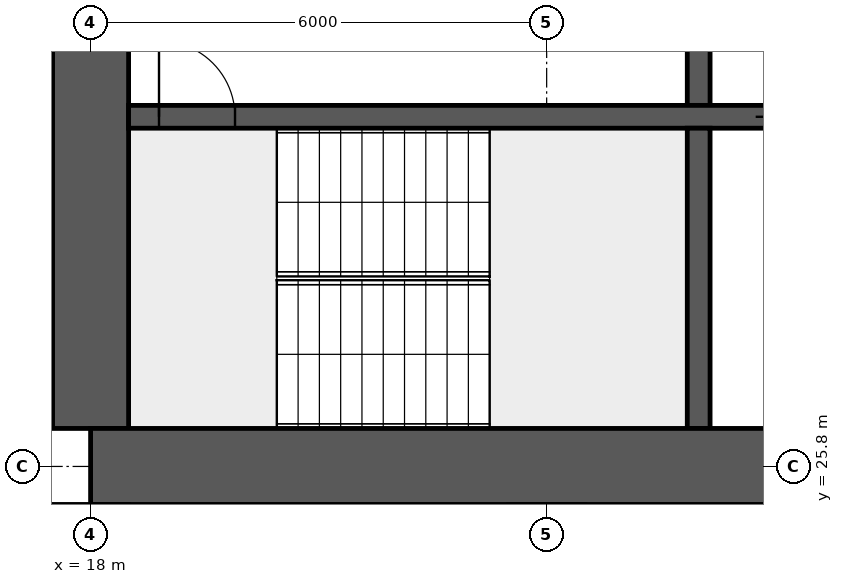
"""IFC4 building model, lengths in metres.
Left out: names, types, materials, properties, quantities, classifications, styles, units other than length and angle.
Written with IfcOpenShell. Run it as: python <this file> out.ifc"""

import sys

from ifc_helpers import new_model, si_unit, direction, frame, frame_2d, origin, place, context, subcontext, project, spatial, rectangle, extrude, element, fill, save


model = new_model("IFC4")
c1 = context("Model", 3, precision=1e-05, world=origin(), true_north=direction((0.0, 1.0)))
c2 = subcontext(c1, "Body", "Model", "MODEL_VIEW")
j1 = project(units=[si_unit("LENGTHUNIT", "METRE"), si_unit("PLANEANGLEUNIT", "RADIAN")], contexts=[c1])
p1 = place(None, origin())
s1 = spatial("IfcSite", under=j1, at=p1, CompositionType="ELEMENT")
p2 = place(p1, origin())
s2 = spatial("IfcBuilding", under=s1, at=p2, CompositionType="ELEMENT")
p3 = place(p2, frame((0.0, 0.0, 27.7)))
s3 = spatial("IfcBuildingStorey", under=s2, at=p3, CompositionType="ELEMENT", Elevation=27.7)
p4 = place(p3, frame((18.0, 25.8, 0.0), z_axis=(0.0, 0.0, 1.0), x_axis=(1.0, 0.0, 0.0)))
e1 = element("IfcWall", 1, at=p4, inside=s3, PredefinedType="SHEAR", context=c2, shape_type="SweptSolid", body=[
    extrude(rectangle(XDim=48.0, YDim=1.0, at=frame_2d((24.0, 0.0))), origin(), (0.0, 0.0, 1.0), 3.75),
])
p5 = place(p3, frame((18.0, 26.3, 0.0), z_axis=(0.0, 0.0, 1.0), x_axis=(0.0, 1.0, 0.0)))
e2 = element("IfcWall", 2, at=p5, inside=s3, PredefinedType="SHEAR", context=c2, shape_type="SweptSolid", body=[
    extrude(rectangle(XDim=11.4, YDim=1.0, at=frame_2d((5.7, 0.0))), origin(), (0.0, 0.0, 1.0), 3.75),
])
p6 = place(p5, frame((5.0, 0.0, 0.0)))
e3 = element("IfcOpeningElement", 3, at=p6, cuts=e2, PredefinedType="OPENING", context=c2, shape_type="SweptSolid", body=[
    extrude(rectangle(XDim=1.2, YDim=2.1, at=frame_2d((0.6, 1.05))), frame((0.0, 0.51, 0.0), z_axis=(0.0, -1.0, 0.0), x_axis=(1.0, 0.0, 0.0)), (0.0, 0.0, 1.0), 1.02),
])
p7 = place(p3, frame((18.5, 30.4, 0.0), z_axis=(0.0, 0.0, 1.0), x_axis=(1.0, 0.0, 0.0)))
e4 = element("IfcWall", 4, at=p7, inside=s3, PredefinedType="SHEAR", context=c2, shape_type="SweptSolid", body=[
    extrude(rectangle(XDim=47.0, YDim=0.3, at=frame_2d((23.5, 0.0))), origin(), (0.0, 0.0, 1.0), 3.75),
])
p8 = place(p7, frame((0.4, 0.0, 0.0)))
e5 = element("IfcOpeningElement", 5, at=p8, cuts=e4, PredefinedType="OPENING", context=c2, shape_type="SweptSolid", body=[
    extrude(rectangle(XDim=1.0, YDim=2.1, at=frame_2d((0.5, 1.05))), frame((0.0, 0.16, 0.0), z_axis=(0.0, -1.0, 0.0), x_axis=(1.0, 0.0, 0.0)), (0.0, 0.0, 1.0), 0.32),
])
p9 = place(p7, frame((45.6, 0.0, 0.0)))
e6 = element("IfcOpeningElement", 6, at=p9, cuts=e4, PredefinedType="OPENING", context=c2, shape_type="SweptSolid", body=[
    extrude(rectangle(XDim=1.0, YDim=2.1, at=frame_2d((0.5, 1.05))), frame((0.0, 0.16, 0.0), z_axis=(0.0, -1.0, 0.0), x_axis=(1.0, 0.0, 0.0)), (0.0, 0.0, 1.0), 0.32),
])
p10 = place(p7, frame((8.25, 0.0, 0.0)))
e7 = element("IfcOpeningElement", 7, at=p10, cuts=e4, PredefinedType="OPENING", context=c2, shape_type="SweptSolid", body=[
    extrude(rectangle(XDim=1.1, YDim=2.1, at=frame_2d((0.55, 1.05))), frame((0.0, 0.16, 0.0), z_axis=(0.0, -1.0, 0.0), x_axis=(1.0, 0.0, 0.0)), (0.0, 0.0, 1.0), 0.32),
])
p11 = place(p7, frame((10.85, 0.0, 0.0)))
e8 = element("IfcOpeningElement", 8, at=p11, cuts=e4, PredefinedType="OPENING", context=c2, shape_type="SweptSolid", body=[
    extrude(rectangle(XDim=1.1, YDim=2.1, at=frame_2d((0.55, 1.05))), frame((0.0, 0.16, 0.0), z_axis=(0.0, -1.0, 0.0), x_axis=(1.0, 0.0, 0.0)), (0.0, 0.0, 1.0), 0.32),
])
p12 = place(p7, frame((13.45, 0.0, 0.0)))
e9 = element("IfcOpeningElement", 9, at=p12, cuts=e4, PredefinedType="OPENING", context=c2, shape_type="SweptSolid", body=[
    extrude(rectangle(XDim=1.1, YDim=2.1, at=frame_2d((0.55, 1.05))), frame((0.0, 0.16, 0.0), z_axis=(0.0, -1.0, 0.0), x_axis=(1.0, 0.0, 0.0)), (0.0, 0.0, 1.0), 0.32),
])
p13 = place(p7, frame((16.05, 0.0, 0.0)))
e10 = element("IfcOpeningElement", 10, at=p13, cuts=e4, PredefinedType="OPENING", context=c2, shape_type="SweptSolid", body=[
    extrude(rectangle(XDim=1.1, YDim=2.1, at=frame_2d((0.55, 1.05))), frame((0.0, 0.16, 0.0), z_axis=(0.0, -1.0, 0.0), x_axis=(1.0, 0.0, 0.0)), (0.0, 0.0, 1.0), 0.32),
])
p14 = place(p7, frame((30.117, 0.0, 0.0)))
e11 = element("IfcOpeningElement", 11, at=p14, cuts=e4, PredefinedType="OPENING", context=c2, shape_type="SweptSolid", body=[
    extrude(rectangle(XDim=1.1, YDim=2.1, at=frame_2d((0.55, 1.05))), frame((0.0, 0.16, 0.0), z_axis=(0.0, -1.0, 0.0), x_axis=(1.0, 0.0, 0.0)), (0.0, 0.0, 1.0), 0.32),
])
p15 = place(p7, frame((33.65, 0.0, 0.0)))
e12 = element("IfcOpeningElement", 12, at=p15, cuts=e4, PredefinedType="OPENING", context=c2, shape_type="SweptSolid", body=[
    extrude(rectangle(XDim=1.1, YDim=2.1, at=frame_2d((0.55, 1.05))), frame((0.0, 0.16, 0.0), z_axis=(0.0, -1.0, 0.0), x_axis=(1.0, 0.0, 0.0)), (0.0, 0.0, 1.0), 0.32),
])
p16 = place(p7, frame((37.183, 0.0, 0.0)))
e13 = element("IfcOpeningElement", 13, at=p16, cuts=e4, PredefinedType="OPENING", context=c2, shape_type="SweptSolid", body=[
    extrude(rectangle(XDim=1.1, YDim=2.1, at=frame_2d((0.55, 1.05))), frame((0.0, 0.16, 0.0), z_axis=(0.0, -1.0, 0.0), x_axis=(1.0, 0.0, 0.0)), (0.0, 0.0, 1.0), 0.32),
])
p17 = place(p3, frame((26.0, 26.3, 0.0), z_axis=(0.0, 0.0, 1.0), x_axis=(0.0, 1.0, 0.0)))
e14 = element("IfcWall", 14, at=p17, inside=s3, PredefinedType="SHEAR", context=c2, shape_type="SweptSolid", body=[
    extrude(rectangle(XDim=3.95, YDim=0.3, at=frame_2d((1.975, 0.0))), origin(), (0.0, 0.0, 1.0), 3.75),
])
p18 = place(p3, frame((26.0, 30.55, 0.0), z_axis=(0.0, 0.0, 1.0), x_axis=(0.0, 1.0, 0.0)))
e15 = element("IfcWall", 15, at=p18, inside=s3, PredefinedType="SHEAR", context=c2, shape_type="SweptSolid", body=[
    extrude(rectangle(XDim=3.9, YDim=0.3, at=frame_2d((1.95, 0.0))), origin(), (0.0, 0.0, 1.0), 3.75),
])
p19 = place(p18, frame((1.4, 0.0, 0.0)))
e16 = element("IfcOpeningElement", 16, at=p19, cuts=e15, PredefinedType="OPENING", context=c2, shape_type="SweptSolid", body=[
    extrude(rectangle(XDim=1.2, YDim=2.1, at=frame_2d((0.6, 1.05))), frame((0.0, 0.16, 0.0), z_axis=(0.0, -1.0, 0.0), x_axis=(1.0, 0.0, 0.0)), (0.0, 0.0, 1.0), 0.32),
])
p20 = place(p3, frame((21.725, 14.9, 0.0), z_axis=(0.0, 0.0, 1.0), x_axis=(0.0, 1.0, 0.0)))
e17 = element("IfcWall", 17, at=p20, inside=s3, PredefinedType="PARTITIONING", context=c2, shape_type="SweptSolid", body=[
    extrude(rectangle(XDim=10.4, YDim=0.15, at=frame_2d((5.2, 0.0))), origin(), (0.0, 0.0, 1.0), 3.5),
])
p21 = place(p8, origin())
e18 = element("IfcDoor", 18, at=p21, inside=s3, OperationType="SINGLE_SWING_LEFT", PredefinedType="DOOR", context=c2, shape_type="SweptSolid", body=[
    extrude(rectangle(XDim=1.0, YDim=2.1, at=frame_2d((0.5, 1.05))), frame((0.0, 0.025, 0.0), z_axis=(0.0, -1.0, 0.0), x_axis=(1.0, 0.0, 0.0)), (0.0, 0.0, 1.0), 0.05),
])
fill(e5, e18)
p22 = place(p10, origin())
e19 = element("IfcDoor", 19, at=p22, inside=s3, OperationType="DOUBLE_DOOR_SLIDING", PredefinedType="DOOR", context=c2, shape_type="SweptSolid", body=[
    extrude(rectangle(XDim=1.1, YDim=2.1, at=frame_2d((0.55, 1.05))), frame((0.0, 0.025, 0.0), z_axis=(0.0, -1.0, 0.0), x_axis=(1.0, 0.0, 0.0)), (0.0, 0.0, 1.0), 0.05),
])
fill(e7, e19)
save(model, sys.argv[1])
